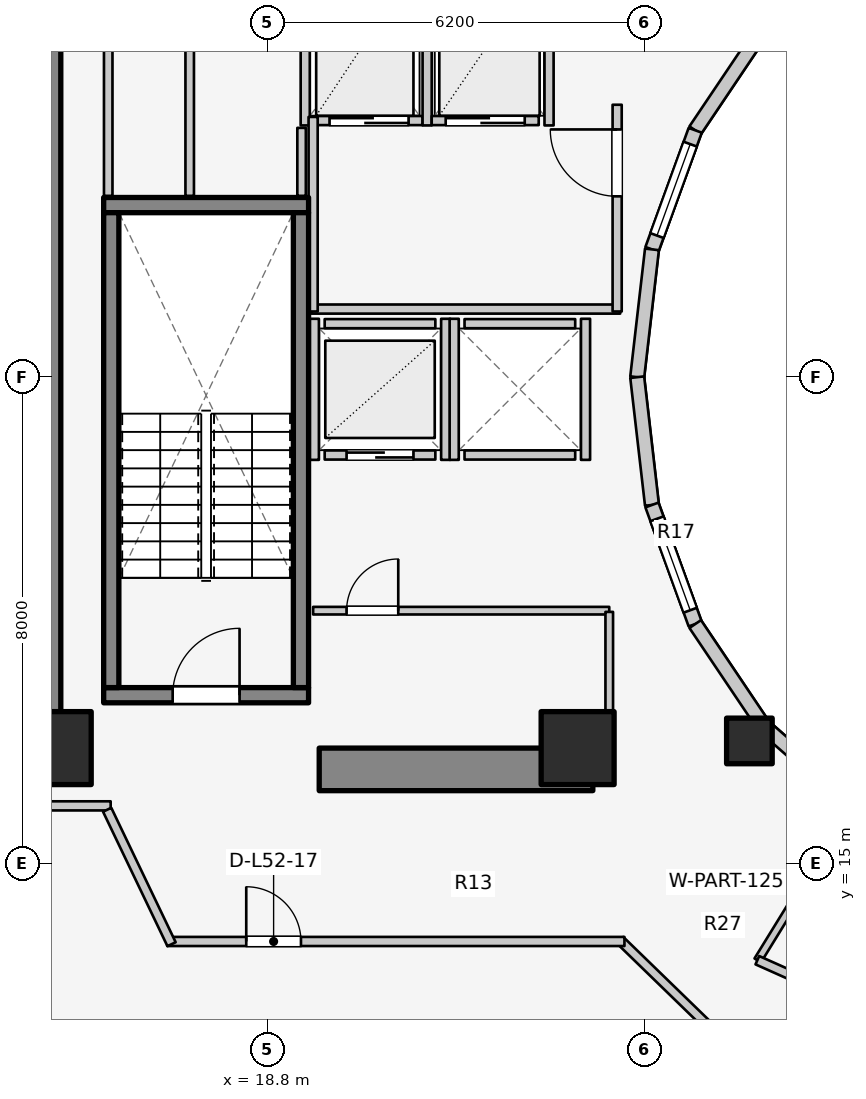
"""IFC4 building model, lengths in metres.
Left out: names, types, materials, properties, quantities, classifications, styles, units other than length and angle.
Written with IfcOpenShell. Run it as: python <this file> out.ifc"""

import sys

from ifc_helpers import new_model, si_unit, direction, frame, frame_2d, origin, origin_2d, place, context, subcontext, project, spatial, rectangle, extrude, element, fill, save


model = new_model("IFC4")
c1 = context("Model", 3, precision=1e-05, world=origin(), true_north=direction((0.0, 1.0)))
c2 = subcontext(c1, "Body", "Model", "MODEL_VIEW")
j1 = project(units=[si_unit("LENGTHUNIT", "METRE"), si_unit("PLANEANGLEUNIT", "RADIAN")], contexts=[c1])
p1 = place(None, origin())
s1 = spatial("IfcSite", under=j1, at=p1, CompositionType="ELEMENT")
p2 = place(p1, origin())
s2 = spatial("IfcBuilding", under=s1, at=p2, CompositionType="ELEMENT")
p3 = place(p2, frame((0.0, 0.0, 171.5)))
s3 = spatial("IfcBuildingStorey", under=s2, at=p3, CompositionType="ELEMENT", Elevation=171.5)
p4 = place(p3, frame((15.05, 17.05, 0.0), z_axis=(0.0, 0.0, 1.0), x_axis=(0.0, 1.0, 0.0)))
e1 = element("IfcWall", 1, at=p4, inside=s3, PredefinedType="SHEAR", context=c2, shape_type="SweptSolid", body=[
    extrude(rectangle(XDim=12.8, YDim=0.7, at=frame_2d((6.4, 0.0))), origin(), (0.0, 0.0, 1.0), 3.1),
])
p5 = place(p3, frame((19.65, 16.55, 0.0), z_axis=(0.0, 0.0, 1.0), x_axis=(1.0, 0.0, 0.0)))
e2 = element("IfcWall", 2, at=p5, inside=s3, PredefinedType="SHEAR", context=c2, shape_type="SweptSolid", body=[
    extrude(rectangle(XDim=4.5, YDim=0.7, at=frame_2d((2.25, 0.0))), origin(), (0.0, 0.0, 1.0), 3.1),
])
p6 = place(p3, frame((16.105, 17.77, 0.0), z_axis=(0.0, 0.0, 1.0), x_axis=(1.0, 0.0, 0.0)))
e3 = element("IfcWall", 3, at=p6, inside=s3, PredefinedType="SOLIDWALL", context=c2, shape_type="SweptSolid", body=[
    extrude(rectangle(XDim=3.37, YDim=0.25, at=frame_2d((1.685, 0.0))), origin(), (0.0, 0.0, 1.0), 3.1),
])
p7 = place(p6, frame((1.135, 0.0, 0.0)))
e4 = element("IfcOpeningElement", 4, at=p7, cuts=e3, PredefinedType="OPENING", context=c2, shape_type="SweptSolid", body=[
    extrude(rectangle(XDim=1.1, YDim=2.1, at=frame_2d((0.55, 1.05))), frame((0.0, 0.135, 0.0), z_axis=(0.0, -1.0, 0.0), x_axis=(1.0, 0.0, 0.0)), (0.0, 0.0, 1.0), 0.27),
])
p8 = place(p3, frame((16.105, 25.83, 0.0), z_axis=(0.0, 0.0, 1.0), x_axis=(1.0, 0.0, 0.0)))
e5 = element("IfcWall", 5, at=p8, inside=s3, PredefinedType="SOLIDWALL", context=c2, shape_type="SweptSolid", body=[
    extrude(rectangle(XDim=3.37, YDim=0.25, at=frame_2d((1.685, 0.0))), origin(), (0.0, 0.0, 1.0), 3.1),
])
for number, where, z_axis, x_axis in (
    (6, (16.23, 17.895, 0.0), (0.0, 0.0, 1.0), (0.0, 1.0, 0.0)),
    (7, (19.35, 17.895, 0.0), (0.0, 0.0, 1.0), (0.0, 1.0, 0.0)),
):
    element("IfcWall", number, at=place(p3, frame(where, z_axis=z_axis, x_axis=x_axis)), inside=s3, PredefinedType="SOLIDWALL", context=c2, shape_type="SweptSolid", body=[
        extrude(rectangle(XDim=7.81, YDim=0.25, at=frame_2d((3.905, 0.0))), origin(), (0.0, 0.0, 1.0), 3.1),
    ])
for number, where, z_axis, x_axis in (
    (8, (15.3, 16.9, 0.0), (0.0, 0.0, 1.0), (1.0, 0.0, 0.0)),
    (9, (23.9, 16.9, 0.0), (0.0, 0.0, 1.0), (1.0, 0.0, 0.0)),
):
    element("IfcColumn", number, at=place(p3, frame(where, z_axis=z_axis, x_axis=x_axis)), inside=s3, PredefinedType="COLUMN", context=c2, shape_type="SweptSolid", body=[
        extrude(rectangle(XDim=1.2, YDim=1.2, at=origin_2d()), origin(), (0.0, 0.0, 1.0), 3.1),
    ])
p9 = place(p3, frame((26.725, 17.018, 0.0), z_axis=(0.0, 0.0, 1.0), x_axis=(1.0, 0.0, 0.0)))
e10 = element("IfcColumn", 10, at=p9, inside=s3, PredefinedType="COLUMN", context=c2, shape_type="SweptSolid", body=[
    extrude(rectangle(XDim=0.75, YDim=0.75, at=origin_2d()), origin(), (0.0, 0.0, 1.0), 3.1),
])
p10 = place(p3, frame((26.965, 28.742, 0.0), z_axis=(0.0, 0.0, 1.0), x_axis=(-0.558197800898, -0.829707909492, 0.0)))
e11 = element("IfcWall", 11, at=p10, inside=s3, PredefinedType="STANDARD", context=c2, shape_type="SweptSolid", body=[
    extrude(rectangle(XDim=2.027, YDim=0.23, at=frame_2d((1.013, 0.0))), origin(), (0.0, 0.0, 1.0), 2.16),
])
p11 = place(p3, frame((25.834, 27.06, 0.0), z_axis=(0.0, 0.0, 1.0), x_axis=(-0.341423187295, -0.93990968033, 0.0)))
e12 = element("IfcWall", 12, at=p11, inside=s3, PredefinedType="STANDARD", context=c2, shape_type="SweptSolid", body=[
    extrude(rectangle(XDim=2.084, YDim=0.23, at=frame_2d((1.042, 0.0))), origin(), (0.0, 0.0, 1.0), 2.84),
])
p12 = place(p11, frame((0.242, 0.0, 0.85)))
e13 = element("IfcOpeningElement", 13, at=p12, cuts=e12, PredefinedType="OPENING", context=c2, shape_type="SweptSolid", body=[
    extrude(rectangle(XDim=1.6, YDim=1.65, at=frame_2d((0.8, 0.825))), frame((0.0, 0.125, 0.0), z_axis=(0.0, -1.0, 0.0), x_axis=(1.0, 0.0, 0.0)), (0.0, 0.0, 1.0), 0.25),
])
for number, where, z_axis, x_axis in (
    (14, (25.123, 25.102, 0.0), (0.0, 0.0, 1.0), (-0.115, -0.993, 0.0)),
    (15, (24.88, 23.0, 0.0), (0.0, 0.0, 1.0), (0.115, -0.993, 0.0)),
):
    element("IfcWall", number, at=place(p3, frame(where, z_axis=z_axis, x_axis=x_axis)), inside=s3, PredefinedType="STANDARD", context=c2, shape_type="SweptSolid", body=[
        extrude(rectangle(XDim=2.115, YDim=0.23, at=frame_2d((1.058, 0.0))), origin(), (0.0, 0.0, 1.0), 2.84),
    ])
p13 = place(p3, frame((25.123, 20.898, 0.0), z_axis=(0.0, 0.0, 1.0), x_axis=(0.341423187295, -0.93990968033, 0.0)))
e16 = element("IfcWall", 16, at=p13, inside=s3, PredefinedType="STANDARD", context=c2, shape_type="SweptSolid", body=[
    extrude(rectangle(XDim=2.084, YDim=0.23, at=frame_2d((1.042, 0.0))), origin(), (0.0, 0.0, 1.0), 2.84),
])
p14 = place(p13, frame((0.242, 0.0, 0.85)))
e17 = element("IfcOpeningElement", 17, at=p14, cuts=e16, PredefinedType="OPENING", context=c2, shape_type="SweptSolid", body=[
    extrude(rectangle(XDim=1.6, YDim=1.65, at=frame_2d((0.8, 0.825))), frame((0.0, 0.125, 0.0), z_axis=(0.0, -1.0, 0.0), x_axis=(1.0, 0.0, 0.0)), (0.0, 0.0, 1.0), 0.25),
])
p15 = place(p3, frame((25.834, 18.94, 0.0), z_axis=(0.0, 0.0, 1.0), x_axis=(0.558197800898, -0.829707909492, 0.0)))
e18 = element("IfcWall", 18, at=p15, inside=s3, PredefinedType="STANDARD", context=c2, shape_type="SweptSolid", body=[
    extrude(rectangle(XDim=2.027, YDim=0.23, at=frame_2d((1.013, 0.0))), origin(), (0.0, 0.0, 1.0), 2.16),
])
p16 = place(p3, frame((26.965, 17.258, 0.0), z_axis=(0.0, 0.0, 1.0), x_axis=(0.752576694707, -0.658504607869, 0.0)))
e19 = element("IfcWall", 19, at=p16, inside=s3, PredefinedType="STANDARD", context=c2, shape_type="SweptSolid", body=[
    extrude(rectangle(XDim=1.959, YDim=0.23, at=frame_2d((0.98, 0.0))), origin(), (0.0, 0.0, 1.0), 2.16),
])
p17 = place(p3, frame((12.381, 13.716, 0.0), z_axis=(0.0, 0.0, 1.0), x_axis=(0.727667301037, -0.68593024354, 0.0)))
e20 = element("IfcWall", 20, at=p17, inside=s3, PredefinedType="STANDARD", context=c2, shape_type="SweptSolid", body=[
    extrude(rectangle(XDim=4.604, YDim=0.26, at=frame_2d((2.302, 0.0))), origin(), (0.0, 0.0, 1.0), 2.85),
])
p18 = place(p17, frame((1.102, 0.0, 0.75)))
e21 = element("IfcOpeningElement", 21, at=p18, cuts=e20, PredefinedType="OPENING", context=c2, shape_type="SweptSolid", body=[
    extrude(rectangle(XDim=2.4, YDim=1.7, at=frame_2d((1.2, 0.85))), frame((0.0, 0.14, 0.0), z_axis=(0.0, -1.0, 0.0), x_axis=(1.0, 0.0, 0.0)), (0.0, 0.0, 1.0), 0.28),
])
p19 = place(p3, frame((19.74, 21.72, 0.0), z_axis=(0.0, 0.0, 1.0), x_axis=(1.0, 0.0, 0.0)))
e22 = element("IfcWall", 22, at=p19, inside=s3, PredefinedType="SOLIDWALL", context=c2, shape_type="SweptSolid", body=[
    extrude(rectangle(XDim=1.82, YDim=0.15, at=frame_2d((0.91, 0.0))), origin(), (0.0, 0.0, 1.0), 2.855),
])
p20 = place(p19, frame((0.36, 0.0, 0.0)))
e23 = element("IfcOpeningElement", 23, at=p20, cuts=e22, PredefinedType="OPENING", context=c2, shape_type="SweptSolid", body=[
    extrude(rectangle(XDim=1.1, YDim=2.1, at=frame_2d((0.55, 1.05))), frame((0.0, 0.085, 0.0), z_axis=(0.0, -1.0, 0.0), x_axis=(1.0, 0.0, 0.0)), (0.0, 0.0, 1.0), 0.17),
])
p21 = place(p3, frame((19.74, 23.88, 0.0), z_axis=(0.0, 0.0, 1.0), x_axis=(1.0, 0.0, 0.0)))
e24 = element("IfcWall", 24, at=p21, inside=s3, PredefinedType="SOLIDWALL", context=c2, shape_type="SweptSolid", body=[
    extrude(rectangle(XDim=1.82, YDim=0.15, at=frame_2d((0.91, 0.0))), origin(), (0.0, 0.0, 1.0), 2.855),
])
for number, where, z_axis, x_axis in (
    (25, (19.57, 21.64, 0.0), (0.0, 0.0, 1.0), (0.0, 1.0, 0.0)),
    (26, (21.73, 21.64, 0.0), (0.0, 0.0, 1.0), (0.0, 1.0, 0.0)),
):
    element("IfcWall", number, at=place(p3, frame(where, z_axis=z_axis, x_axis=x_axis)), inside=s3, PredefinedType="SOLIDWALL", context=c2, shape_type="SweptSolid", body=[
        extrude(rectangle(XDim=2.32, YDim=0.15, at=frame_2d((1.16, 0.0))), origin(), (0.0, 0.0, 1.0), 2.855),
    ])
for number, where, z_axis, x_axis in (
    (27, (22.04, 21.72, 0.0), (0.0, 0.0, 1.0), (1.0, 0.0, 0.0)),
    (28, (22.04, 23.88, 0.0), (0.0, 0.0, 1.0), (1.0, 0.0, 0.0)),
):
    element("IfcWall", number, at=place(p3, frame(where, z_axis=z_axis, x_axis=x_axis)), inside=s3, PredefinedType="SOLIDWALL", context=c2, shape_type="SweptSolid", body=[
        extrude(rectangle(XDim=1.82, YDim=0.15, at=frame_2d((0.91, 0.0))), origin(), (0.0, 0.0, 1.0), 2.12),
    ])
p22 = place(p3, frame((21.87, 21.64, 0.0), z_axis=(0.0, 0.0, 1.0), x_axis=(0.0, 1.0, 0.0)))
e29 = element("IfcWall", 29, at=p22, inside=s3, PredefinedType="SOLIDWALL", context=c2, shape_type="SweptSolid", body=[
    extrude(rectangle(XDim=2.32, YDim=0.15, at=frame_2d((1.16, 0.0))), origin(), (0.0, 0.0, 1.0), 2.855),
])
p23 = place(p3, frame((24.03, 21.64, 0.0), z_axis=(0.0, 0.0, 1.0), x_axis=(0.0, 1.0, 0.0)))
e30 = element("IfcWall", 30, at=p23, inside=s3, PredefinedType="SOLIDWALL", context=c2, shape_type="SweptSolid", body=[
    extrude(rectangle(XDim=2.32, YDim=0.15, at=frame_2d((1.16, 0.0))), origin(), (0.0, 0.0, 1.0), 2.12),
])
p24 = place(p3, frame((19.59, 27.22, 0.0), z_axis=(0.0, 0.0, 1.0), x_axis=(1.0, 0.0, 0.0)))
e31 = element("IfcWall", 31, at=p24, inside=s3, PredefinedType="SOLIDWALL", context=c2, shape_type="SweptSolid", body=[
    extrude(rectangle(XDim=1.76, YDim=0.15, at=frame_2d((0.88, 0.0))), origin(), (0.0, 0.0, 1.0), 2.855),
])
p25 = place(p24, frame((0.23, 0.0, 0.0)))
e32 = element("IfcOpeningElement", 32, at=p25, cuts=e31, PredefinedType="OPENING", context=c2, shape_type="SweptSolid", body=[
    extrude(rectangle(XDim=1.3, YDim=2.1, at=frame_2d((0.65, 1.05))), frame((0.0, 0.085, 0.0), z_axis=(0.0, -1.0, 0.0), x_axis=(1.0, 0.0, 0.0)), (0.0, 0.0, 1.0), 0.17),
])
for number, where, z_axis, x_axis in (
    (33, (19.42, 27.14, 0.0), (0.0, 0.0, 1.0), (0.0, 1.0, 0.0)),
    (34, (21.425, 27.14, 0.0), (0.0, 0.0, 1.0), (0.0, 1.0, 0.0)),
):
    element("IfcWall", number, at=place(p3, frame(where, z_axis=z_axis, x_axis=x_axis)), inside=s3, PredefinedType="SOLIDWALL", context=c2, shape_type="SweptSolid", body=[
        extrude(rectangle(XDim=2.72, YDim=0.15, at=frame_2d((1.36, 0.0))), origin(), (0.0, 0.0, 1.0), 2.855),
    ])
p26 = place(p3, frame((21.5, 27.22, 0.0), z_axis=(0.0, 0.0, 1.0), x_axis=(1.0, 0.0, 0.0)))
e35 = element("IfcWall", 35, at=p26, inside=s3, PredefinedType="SOLIDWALL", context=c2, shape_type="SweptSolid", body=[
    extrude(rectangle(XDim=1.76, YDim=0.15, at=frame_2d((0.88, 0.0))), origin(), (0.0, 0.0, 1.0), 2.855),
])
p27 = place(p26, frame((0.23, 0.0, 0.0)))
e36 = element("IfcOpeningElement", 36, at=p27, cuts=e35, PredefinedType="OPENING", context=c2, shape_type="SweptSolid", body=[
    extrude(rectangle(XDim=1.3, YDim=2.1, at=frame_2d((0.65, 1.05))), frame((0.0, 0.085, 0.0), z_axis=(0.0, -1.0, 0.0), x_axis=(1.0, 0.0, 0.0)), (0.0, 0.0, 1.0), 0.17),
])
p28 = place(p3, frame((23.43, 27.14, 0.0), z_axis=(0.0, 0.0, 1.0), x_axis=(0.0, 1.0, 0.0)))
e37 = element("IfcWall", 37, at=p28, inside=s3, PredefinedType="SOLIDWALL", context=c2, shape_type="SweptSolid", body=[
    extrude(rectangle(XDim=2.72, YDim=0.15, at=frame_2d((1.36, 0.0))), origin(), (0.0, 0.0, 1.0), 2.855),
])
p29 = place(p3, frame((19.52, 24.12, 0.0), z_axis=(0.0, 0.0, 1.0), x_axis=(1.0, 0.0, 0.0)))
e38 = element("IfcWall", 38, at=p29, inside=s3, PredefinedType="PARTITIONING", context=c2, shape_type="SweptSolid", body=[
    extrude(rectangle(XDim=5.08, YDim=0.15, at=frame_2d((2.54, 0.0))), origin(), (0.0, 0.0, 1.0), 2.12),
])
p30 = place(p3, frame((19.55, 24.08, 0.0), z_axis=(0.0, 0.0, 1.0), x_axis=(0.0, 1.0, 0.0)))
e39 = element("IfcWall", 39, at=p30, inside=s3, PredefinedType="PARTITIONING", context=c2, shape_type="SweptSolid", body=[
    extrude(rectangle(XDim=3.2, YDim=0.15, at=frame_2d((1.6, 0.0))), origin(), (0.0, 0.0, 1.0), 2.855),
])
p31 = place(p3, frame((24.55, 24.08, 0.0), z_axis=(0.0, 0.0, 1.0), x_axis=(0.0, 1.0, 0.0)))
e40 = element("IfcWall", 40, at=p31, inside=s3, PredefinedType="PARTITIONING", context=c2, shape_type="SweptSolid", body=[
    extrude(rectangle(XDim=3.4, YDim=0.15, at=frame_2d((1.7, 0.0))), origin(), (0.0, 0.0, 1.0), 2.855),
])
p32 = place(p31, frame((1.894, 0.0, 0.0)))
e41 = element("IfcOpeningElement", 41, at=p32, cuts=e40, PredefinedType="OPENING", context=c2, shape_type="SweptSolid", body=[
    extrude(rectangle(XDim=1.1, YDim=2.1, at=frame_2d((0.55, 1.05))), frame((0.0, 0.085, 0.0), z_axis=(0.0, -1.0, 0.0), x_axis=(1.0, 0.0, 0.0)), (0.0, 0.0, 1.0), 0.17),
])
p33 = place(p3, frame((19.55, 19.16, 0.0), z_axis=(0.0, 0.0, 1.0), x_axis=(1.0, 0.0, 0.0)))
e42 = element("IfcWall", 42, at=p33, inside=s3, PredefinedType="PARTITIONING", context=c2, shape_type="SweptSolid", body=[
    extrude(rectangle(XDim=4.87, YDim=0.125, at=frame_2d((2.435, 0.0))), origin(), (0.0, 0.0, 1.0), 2.12),
])
p34 = place(p33, frame((0.55, 0.0, 0.0)))
e43 = element("IfcOpeningElement", 43, at=p34, cuts=e42, PredefinedType="OPENING", context=c2, shape_type="SweptSolid", body=[
    extrude(rectangle(XDim=0.85, YDim=2.05, at=frame_2d((0.425, 1.025))), frame((0.0, 0.073, 0.0), z_axis=(0.0, -1.0, 0.0), x_axis=(1.0, 0.0, 0.0)), (0.0, 0.0, 1.0), 0.145),
])
p35 = place(p3, frame((24.42, 17.1, 0.0), z_axis=(0.0, 0.0, 1.0), x_axis=(0.0, 1.0, 0.0)))
e44 = element("IfcWall", 44, at=p35, inside=s3, PredefinedType="PARTITIONING", context=c2, shape_type="SweptSolid", body=[
    extrude(rectangle(XDim=2.04, YDim=0.125, at=frame_2d((1.02, 0.0))), origin(), (0.0, 0.0, 1.0), 2.232),
])
for number, where, z_axis, x_axis in (
    (45, (16.18, 25.98, 0.0), (0.0, 0.0, 1.0), (0.0, 1.0, 0.0)),
    (46, (17.52, 25.98, 0.0), (0.0, 0.0, 1.0), (0.0, 1.0, 0.0)),
):
    element("IfcWall", number, at=place(p3, frame(where, z_axis=z_axis, x_axis=x_axis)), inside=s3, PredefinedType="PLUMBINGWALL", context=c2, shape_type="SweptSolid", body=[
        extrude(rectangle(XDim=3.88, YDim=0.14, at=frame_2d((1.94, 0.0))), origin(), (0.0, 0.0, 1.0), 2.855),
    ])
p36 = place(p3, frame((19.36, 25.98, 0.0), z_axis=(0.0, 0.0, 1.0), x_axis=(0.0, 1.0, 0.0)))
e47 = element("IfcWall", 47, at=p36, inside=s3, PredefinedType="PLUMBINGWALL", context=c2, shape_type="SweptSolid", body=[
    extrude(rectangle(XDim=1.12, YDim=0.14, at=frame_2d((0.56, 0.0))), origin(), (0.0, 0.0, 1.0), 2.855),
])
p37 = place(p3, frame((10.96, 15.95, 0.0), z_axis=(0.0, 0.0, 1.0), x_axis=(1.0, 0.0, 0.0)))
e48 = element("IfcWall", 48, at=p37, inside=s3, PredefinedType="PARTITIONING", context=c2, shape_type="SweptSolid", body=[
    extrude(rectangle(XDim=5.26, YDim=0.15, at=frame_2d((2.63, 0.0))), origin(), (0.0, 0.0, 1.0), 2.22),
])
p38 = place(p3, frame((26.133, 12.251, 0.0), z_axis=(0.0, 0.0, 1.0), x_axis=(-0.717419568599, 0.696641344302, 0.0)))
e49 = element("IfcWall", 49, at=p38, inside=s3, PredefinedType="PARTITIONING", context=c2, shape_type="SweptSolid", body=[
    extrude(rectangle(XDim=2.138, YDim=0.15, at=frame_2d((1.069, 0.0))), origin(), (0.0, 0.0, 1.0), 2.299),
])
p39 = place(p3, frame((17.15, 13.72, 0.0), z_axis=(0.0, 0.0, 1.0), x_axis=(1.0, 0.0, 0.0)))
e50 = element("IfcWall", 50, at=p39, inside=s3, PredefinedType="PARTITIONING", context=c2, shape_type="SweptSolid", body=[
    extrude(rectangle(XDim=7.52, YDim=0.15, at=frame_2d((3.76, 0.0))), origin(), (0.0, 0.0, 1.0), 2.299),
])
p40 = place(p39, frame((1.3, 0.0, 0.0)))
e51 = element("IfcOpeningElement", 51, at=p40, cuts=e50, PredefinedType="OPENING", context=c2, shape_type="SweptSolid", body=[
    extrude(rectangle(XDim=0.9, YDim=2.1, at=frame_2d((0.45, 1.05))), frame((0.0, 0.085, 0.0), z_axis=(0.0, -1.0, 0.0), x_axis=(1.0, 0.0, 0.0)), (0.0, 0.0, 1.0), 0.17),
])
p41 = place(p3, frame((17.222, 13.675, 0.0), z_axis=(0.0, 0.0, 1.0), x_axis=(-0.431973389813, 0.901886351207, 0.0)))
e52 = element("IfcWall", 52, at=p41, inside=s3, PredefinedType="PARTITIONING", context=c2, shape_type="SweptSolid", body=[
    extrude(rectangle(XDim=2.452, YDim=0.15, at=frame_2d((1.226, 0.0))), origin(), (0.0, 0.0, 1.0), 2.855),
])
p42 = place(p3, frame((28.45, 15.985, 0.0), z_axis=(0.0, 0.0, 1.0), x_axis=(-0.524565340045, -0.851370192116, 0.0)))
e53 = element("IfcWall", 53, at=p42, inside=s3, PredefinedType="PARTITIONING", context=c2, shape_type="SweptSolid", body=[
    extrude(rectangle(XDim=3.027, YDim=0.125, at=frame_2d((1.514, 0.0))), origin(), (0.0, 0.0, 1.0), 2.299),
])
p43 = place(p3, frame((26.856, 13.412, 0.0), z_axis=(0.0, 0.0, 1.0), x_axis=(0.912985265053, -0.407992531545, 0.0)))
e54 = element("IfcWall", 54, at=p43, inside=s3, PredefinedType="PARTITIONING", context=c2, shape_type="SweptSolid", body=[
    extrude(rectangle(XDim=2.723, YDim=0.15, at=frame_2d((1.362, 0.0))), origin(), (0.0, 0.0, 1.0), 2.299),
])
p44 = place(p12, origin())
e55 = element("IfcWindow", 55, at=p44, inside=s3, PartitioningType="SINGLE_PANEL", PredefinedType="WINDOW", context=c2, shape_type="SweptSolid", body=[
    extrude(rectangle(XDim=1.6, YDim=1.65, at=frame_2d((0.8, 0.825))), frame((0.0, 0.03, 0.0), z_axis=(0.0, -1.0, 0.0), x_axis=(1.0, 0.0, 0.0)), (0.0, 0.0, 1.0), 0.06),
])
fill(e13, e55)
p45 = place(p14, origin())
e56 = element("IfcWindow", 56, at=p45, inside=s3, PartitioningType="SINGLE_PANEL", PredefinedType="WINDOW", context=c2, shape_type="SweptSolid", body=[
    extrude(rectangle(XDim=1.6, YDim=1.65, at=frame_2d((0.8, 0.825))), frame((0.0, 0.03, 0.0), z_axis=(0.0, -1.0, 0.0), x_axis=(1.0, 0.0, 0.0)), (0.0, 0.0, 1.0), 0.06),
])
fill(e17, e56)
p46 = place(p7, origin())
e57 = element("IfcDoor", 57, at=p46, inside=s3, OperationType="SINGLE_SWING_RIGHT", PredefinedType="DOOR", context=c2, shape_type="SweptSolid", body=[
    extrude(rectangle(XDim=1.1, YDim=2.1, at=frame_2d((0.55, 1.05))), frame((0.0, 0.025, 0.0), z_axis=(0.0, -1.0, 0.0), x_axis=(1.0, 0.0, 0.0)), (0.0, 0.0, 1.0), 0.05),
])
fill(e4, e57)
p47 = place(p20, origin())
e58 = element("IfcDoor", 58, at=p47, inside=s3, OperationType="DOUBLE_DOOR_SLIDING", PredefinedType="DOOR", context=c2, shape_type="SweptSolid", body=[
    extrude(rectangle(XDim=1.1, YDim=2.1, at=frame_2d((0.55, 1.05))), frame((0.0, 0.025, 0.0), z_axis=(0.0, -1.0, 0.0), x_axis=(1.0, 0.0, 0.0)), (0.0, 0.0, 1.0), 0.05),
])
fill(e23, e58)
p48 = place(p25, origin())
e59 = element("IfcDoor", 59, at=p48, inside=s3, OperationType="DOUBLE_DOOR_SLIDING", PredefinedType="DOOR", context=c2, shape_type="SweptSolid", body=[
    extrude(rectangle(XDim=1.3, YDim=2.1, at=frame_2d((0.65, 1.05))), frame((0.0, 0.025, 0.0), z_axis=(0.0, -1.0, 0.0), x_axis=(1.0, 0.0, 0.0)), (0.0, 0.0, 1.0), 0.05),
])
fill(e32, e59)
p49 = place(p27, origin())
e60 = element("IfcDoor", 60, at=p49, inside=s3, OperationType="DOUBLE_DOOR_SLIDING", PredefinedType="DOOR", context=c2, shape_type="SweptSolid", body=[
    extrude(rectangle(XDim=1.3, YDim=2.1, at=frame_2d((0.65, 1.05))), frame((0.0, 0.025, 0.0), z_axis=(0.0, -1.0, 0.0), x_axis=(1.0, 0.0, 0.0)), (0.0, 0.0, 1.0), 0.05),
])
fill(e36, e60)
p50 = place(p32, origin())
e61 = element("IfcDoor", 61, at=p50, inside=s3, OperationType="SINGLE_SWING_RIGHT", PredefinedType="DOOR", context=c2, shape_type="SweptSolid", body=[
    extrude(rectangle(XDim=1.1, YDim=2.1, at=frame_2d((0.55, 1.05))), frame((0.0, 0.025, 0.0), z_axis=(0.0, -1.0, 0.0), x_axis=(1.0, 0.0, 0.0)), (0.0, 0.0, 1.0), 0.05),
])
fill(e41, e61)
p51 = place(p34, origin())
e62 = element("IfcDoor", 62, at=p51, inside=s3, OperationType="SINGLE_SWING_RIGHT", PredefinedType="DOOR", context=c2, shape_type="SweptSolid", body=[
    extrude(rectangle(XDim=0.85, YDim=2.05, at=frame_2d((0.425, 1.025))), frame((0.0, 0.025, 0.0), z_axis=(0.0, -1.0, 0.0), x_axis=(1.0, 0.0, 0.0)), (0.0, 0.0, 1.0), 0.05),
])
fill(e43, e62)
p52 = place(p40, origin())
e63 = element("IfcDoor", 63, at=p52, inside=s3, OperationType="SINGLE_SWING_LEFT", PredefinedType="DOOR", context=c2, shape_type="SweptSolid", body=[
    extrude(rectangle(XDim=0.9, YDim=2.1, at=frame_2d((0.45, 1.05))), frame((0.0, 0.025, 0.0), z_axis=(0.0, -1.0, 0.0), x_axis=(1.0, 0.0, 0.0)), (0.0, 0.0, 1.0), 0.05),
])
fill(e51, e63)
save(model, sys.argv[1])
